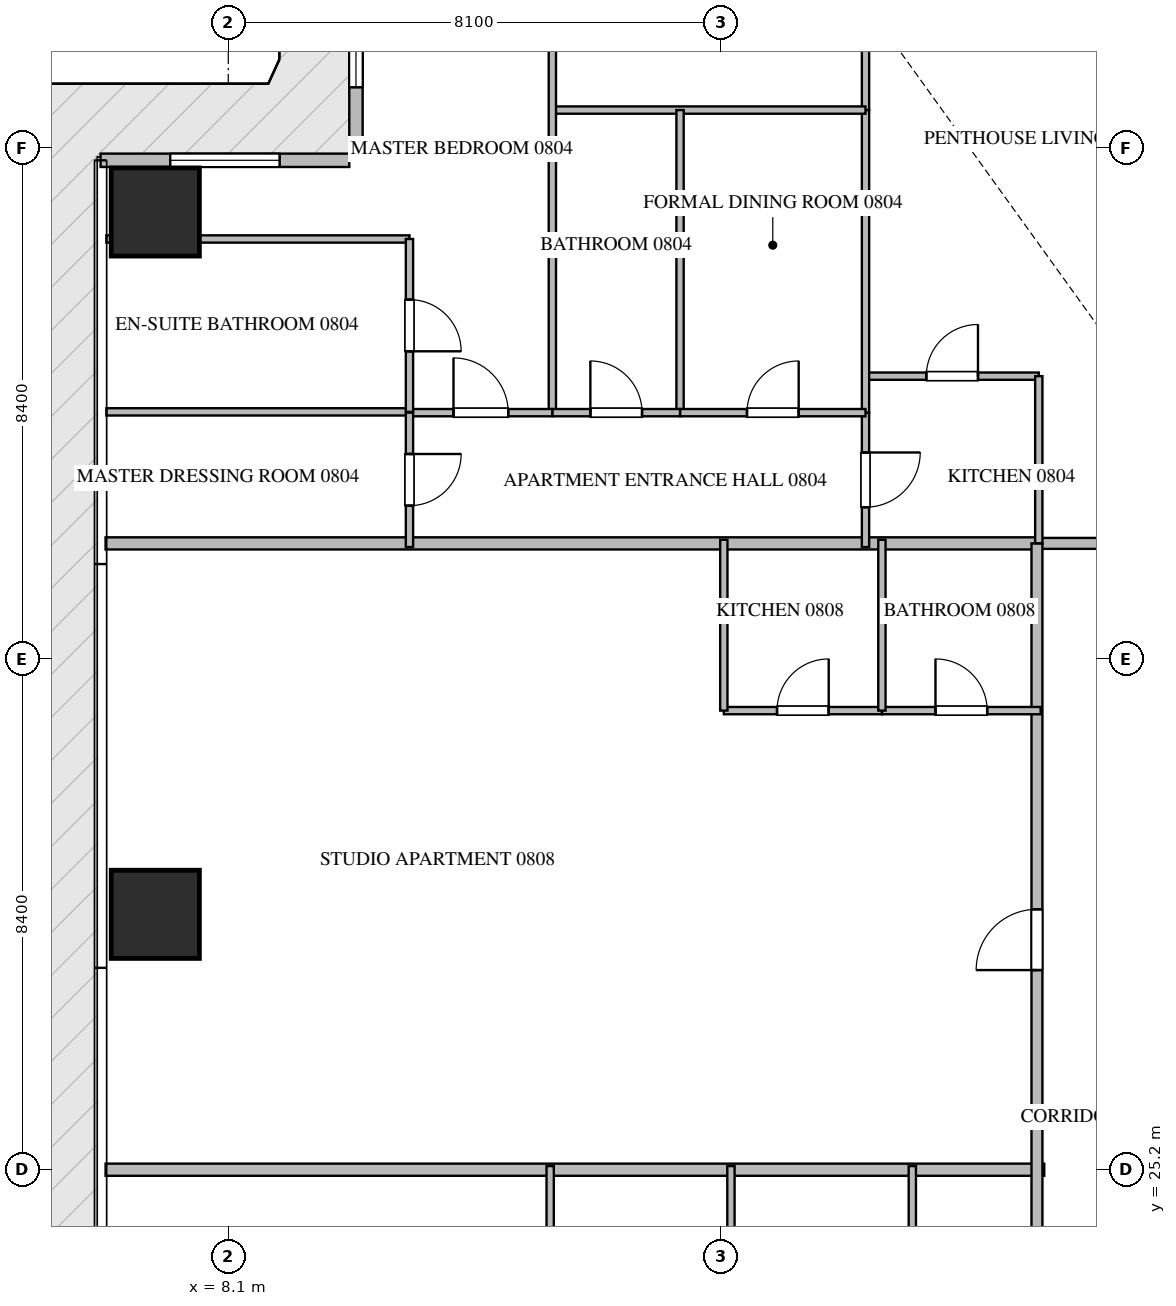
"""IFC4 building model, lengths in metres.
Left out: names, types, materials, properties, quantities, classifications, styles, units other than length and angle.
Written with IfcOpenShell. Run it as: python <this file> out.ifc"""

import sys

from ifc_helpers import new_model, si_unit, direction, frame, frame_2d, origin, origin_2d, place, context, subcontext, project, spatial, rectangle, extrude, source, transform, mapped, element, fill, save


model = new_model("IFC4")
c1 = context("Model", 3, precision=1e-05, world=origin(), true_north=direction((0.0, 1.0)))
c2 = subcontext(c1, "Body", "Model", "MODEL_VIEW")
j1 = project(units=[si_unit("LENGTHUNIT", "METRE"), si_unit("PLANEANGLEUNIT", "RADIAN")], contexts=[c1])
p1 = place(None, origin())
s1 = spatial("IfcSite", under=j1, at=p1, CompositionType="ELEMENT")
p2 = place(p1, origin())
s2 = spatial("IfcBuilding", under=s1, at=p2, CompositionType="ELEMENT")
p3 = place(p2, frame((0.0, 0.0, 37.95)))
s3 = spatial("IfcBuildingStorey", under=s2, at=p3, CompositionType="ELEMENT", Elevation=37.95)
m1 = source(origin(), c2, "Body", "SweptSolid", [
    extrude(rectangle(XDim=1.45, YDim=1.45, at=origin_2d()), origin(), (0.0, 0.0, 1.0), 3.75),
])
for number, where, z_axis, x_axis in (
    (1, (6.9, 29.4, -0.26), (0.0, 0.0, 1.0), (1.0, 0.0, 0.0)),
    (2, (6.9, 40.95, -0.26), (0.0, 0.0, 1.0), (1.0, 0.0, 0.0)),
):
    element("IfcColumn", number, at=place(p3, frame(where, z_axis=z_axis, x_axis=x_axis)), inside=s3, PredefinedType="COLUMN", context=c2, shape_type="MappedRepresentation", body=[
        mapped(m1, transform((0.0, 0.0, 0.0), scale=1.0)),
    ])
p4 = place(p3, frame((10.2, 45.89, 0.0), z_axis=(0.0, 0.0, 1.0), x_axis=(0.0, -1.0, 0.0)))
e3 = element("IfcWall", 3, at=p4, inside=s3, PredefinedType="ELEMENTEDWALL", context=c2, shape_type="SweptSolid", body=[
    extrude(rectangle(XDim=3.98, YDim=0.22, at=frame_2d((1.99, 0.0))), origin(), (0.0, 0.0, 1.0), 3.475),
])
p5 = place(p4, frame((1.09, 0.0, 0.65)))
e4 = element("IfcOpeningElement", 4, at=p5, cuts=e3, PredefinedType="OPENING", context=c2, shape_type="SweptSolid", body=[
    extrude(rectangle(XDim=1.8, YDim=2.1, at=frame_2d((0.9, 1.05))), frame((0.0, 0.12, 0.0), z_axis=(0.0, -1.0, 0.0), x_axis=(1.0, 0.0, 0.0)), (0.0, 0.0, 1.0), 0.24),
])
p6 = place(p3, frame((10.09, 41.8, 0.0), z_axis=(0.0, 0.0, 1.0), x_axis=(-1.0, 0.0, 0.0)))
e5 = element("IfcWall", 5, at=p6, inside=s3, PredefinedType="ELEMENTEDWALL", context=c2, shape_type="SweptSolid", body=[
    extrude(rectangle(XDim=4.09, YDim=0.22, at=frame_2d((2.045, 0.0))), origin(), (0.0, 0.0, 1.0), 3.475),
])
p7 = place(p6, frame((1.145, 0.0, 0.65)))
e6 = element("IfcOpeningElement", 6, at=p7, cuts=e5, PredefinedType="OPENING", context=c2, shape_type="SweptSolid", body=[
    extrude(rectangle(XDim=1.8, YDim=2.1, at=frame_2d((0.9, 1.05))), frame((0.0, 0.12, 0.0), z_axis=(0.0, -1.0, 0.0), x_axis=(1.0, 0.0, 0.0)), (0.0, 0.0, 1.0), 0.24),
])
p8 = place(p3, frame((6.082, 25.2, 0.0), z_axis=(0.0, 0.0, 1.0), x_axis=(1.0, 0.0, 0.0)))
e7 = element("IfcWall", 7, at=p8, inside=s3, PredefinedType="PARTITIONING", context=c2, shape_type="SweptSolid", body=[
    extrude(rectangle(XDim=15.438, YDim=0.2, at=frame_2d((7.719, 0.0))), origin(), (0.0, 0.0, 1.0), 3.49),
])
p9 = place(p3, frame((6.082, 35.5, 0.0), z_axis=(0.0, 0.0, 1.0), x_axis=(1.0, 0.0, 0.0)))
e8 = element("IfcWall", 8, at=p9, inside=s3, PredefinedType="PARTITIONING", context=c2, shape_type="SweptSolid", body=[
    extrude(rectangle(XDim=15.318, YDim=0.2, at=frame_2d((7.659, 0.0))), origin(), (0.0, 0.0, 1.0), 3.49),
])
p10 = place(p3, frame((21.402, 35.5, 0.0), z_axis=(0.0, 0.0, 1.0), x_axis=(1.0, 0.0, 0.0)))
e9 = element("IfcWall", 9, at=p10, inside=s3, PredefinedType="PARTITIONING", context=c2, shape_type="SweptSolid", body=[
    extrude(rectangle(XDim=21.996, YDim=0.18, at=frame_2d((10.998, 0.0))), origin(), (0.0, 0.0, 1.0), 3.49),
])
p11 = place(p10, frame((2.1, 0.0, 0.0)))
e10 = element("IfcOpeningElement", 10, at=p11, cuts=e9, PredefinedType="OPENING", context=c2, shape_type="SweptSolid", body=[
    extrude(rectangle(XDim=1.0, YDim=2.15, at=frame_2d((0.5, 1.075))), frame((0.0, 0.1, 0.0), z_axis=(0.0, -1.0, 0.0), x_axis=(1.0, 0.0, 0.0)), (0.0, 0.0, 1.0), 0.2),
])
p12 = place(p10, frame((10.498, 0.0, 0.0)))
e11 = element("IfcOpeningElement", 11, at=p12, cuts=e9, PredefinedType="OPENING", context=c2, shape_type="SweptSolid", body=[
    extrude(rectangle(XDim=1.0, YDim=2.15, at=frame_2d((0.5, 1.075))), frame((0.0, 0.1, 0.0), z_axis=(0.0, -1.0, 0.0), x_axis=(1.0, 0.0, 0.0)), (0.0, 0.0, 1.0), 0.2),
])
p13 = place(p10, frame((16.272, 0.0, 0.0)))
e12 = element("IfcOpeningElement", 12, at=p13, cuts=e9, PredefinedType="OPENING", context=c2, shape_type="SweptSolid", body=[
    extrude(rectangle(XDim=1.0, YDim=2.15, at=frame_2d((0.5, 1.075))), frame((0.0, 0.1, 0.0), z_axis=(0.0, -1.0, 0.0), x_axis=(1.0, 0.0, 0.0)), (0.0, 0.0, 1.0), 0.2),
])
p14 = place(p3, frame((21.4, 14.9, 0.0), z_axis=(0.0, 0.0, 1.0), x_axis=(0.0, 1.0, 0.0)))
e13 = element("IfcWall", 13, at=p14, inside=s3, PredefinedType="PARTITIONING", context=c2, shape_type="SweptSolid", body=[
    extrude(rectangle(XDim=20.6, YDim=0.18, at=frame_2d((10.3, 0.0))), origin(), (0.0, 0.0, 1.0), 3.49),
])
p15 = place(p14, frame((1.96, 0.0, 0.0)))
e14 = element("IfcOpeningElement", 14, at=p15, cuts=e13, PredefinedType="OPENING", context=c2, shape_type="SweptSolid", body=[
    extrude(rectangle(XDim=1.0, YDim=2.15, at=frame_2d((0.5, 1.075))), frame((0.0, 0.1, 0.0), z_axis=(0.0, -1.0, 0.0), x_axis=(1.0, 0.0, 0.0)), (0.0, 0.0, 1.0), 0.2),
])
p16 = place(p14, frame((13.583, 0.0, 0.0)))
e15 = element("IfcOpeningElement", 15, at=p16, cuts=e13, PredefinedType="OPENING", context=c2, shape_type="SweptSolid", body=[
    extrude(rectangle(XDim=1.0, YDim=2.15, at=frame_2d((0.5, 1.075))), frame((0.0, 0.1, 0.0), z_axis=(0.0, -1.0, 0.0), x_axis=(1.0, 0.0, 0.0)), (0.0, 0.0, 1.0), 0.2),
])
p17 = place(p3, frame((18.58, 38.25, 0.0), z_axis=(0.0, 0.0, 1.0), x_axis=(1.0, 0.0, 0.0)))
e16 = element("IfcWall", 16, at=p17, inside=s3, PredefinedType="PARTITIONING", context=c2, shape_type="SweptSolid", body=[
    extrude(rectangle(XDim=2.85, YDim=0.12, at=frame_2d((1.425, 0.0))), origin(), (0.0, 0.0, 1.0), 3.49),
])
p18 = place(p17, frame((1.0, 0.0, 0.0)))
e17 = element("IfcOpeningElement", 17, at=p18, cuts=e16, PredefinedType="OPENING", context=c2, shape_type="SweptSolid", body=[
    extrude(rectangle(XDim=0.85, YDim=2.1, at=frame_2d((0.425, 1.05))), frame((0.0, 0.07, 0.0), z_axis=(0.0, -1.0, 0.0), x_axis=(1.0, 0.0, 0.0)), (0.0, 0.0, 1.0), 0.14),
])
p19 = place(p3, frame((21.43, 38.25, 0.0), z_axis=(0.0, 0.0, 1.0), x_axis=(0.0, -1.0, 0.0)))
e18 = element("IfcWall", 18, at=p19, inside=s3, PredefinedType="PARTITIONING", context=c2, shape_type="SweptSolid", body=[
    extrude(rectangle(XDim=2.748, YDim=0.12, at=frame_2d((1.374, 0.0))), origin(), (0.0, 0.0, 1.0), 3.49),
])
p20 = place(p3, frame((18.58, 37.65, 0.0), z_axis=(0.0, 0.0, 1.0), x_axis=(0.0, -1.0, 0.0)))
e19 = element("IfcWall", 19, at=p20, inside=s3, PredefinedType="PARTITIONING", context=c2, shape_type="SweptSolid", body=[
    extrude(rectangle(XDim=2.21, YDim=0.12, at=frame_2d((1.105, 0.0))), origin(), (0.0, 0.0, 1.0), 3.49),
])
p21 = place(p20, frame((0.655, 0.0, 0.0)))
e20 = element("IfcOpeningElement", 20, at=p21, cuts=e19, PredefinedType="OPENING", context=c2, shape_type="SweptSolid", body=[
    extrude(rectangle(XDim=0.9, YDim=2.1, at=frame_2d((0.45, 1.05))), frame((0.0, 0.07, 0.0), z_axis=(0.0, -1.0, 0.0), x_axis=(1.0, 0.0, 0.0)), (0.0, 0.0, 1.0), 0.14),
])
p22 = place(p3, frame((18.58, 50.105, 0.0), z_axis=(0.0, 0.0, 1.0), x_axis=(0.0, -1.0, 0.0)))
e21 = element("IfcWall", 21, at=p22, inside=s3, PredefinedType="PARTITIONING", context=c2, shape_type="SweptSolid", body=[
    extrude(rectangle(XDim=7.479, YDim=0.12, at=frame_2d((3.74, 0.0))), origin(), (0.0, 0.0, 1.0), 3.49),
])
p23 = place(p22, frame((3.618, 0.0, 0.0)))
e22 = element("IfcOpeningElement", 22, at=p23, cuts=e21, PredefinedType="OPENING", context=c2, shape_type="SweptSolid", body=[
    extrude(rectangle(XDim=0.9, YDim=2.1, at=frame_2d((0.45, 1.05))), frame((0.0, 0.07, 0.0), z_axis=(0.0, -1.0, 0.0), x_axis=(1.0, 0.0, 0.0)), (0.0, 0.0, 1.0), 0.14),
])
p24 = place(p3, frame((18.58, 42.624, 0.0), z_axis=(0.0, 0.0, 1.0), x_axis=(0.0, -1.0, 0.0)))
e23 = element("IfcWall", 23, at=p24, inside=s3, PredefinedType="PARTITIONING", context=c2, shape_type="SweptSolid", body=[
    extrude(rectangle(XDim=4.972, YDim=0.12, at=frame_2d((2.486, 0.0))), origin(), (0.0, 0.0, 1.0), 3.49),
])
p25 = place(p3, frame((13.43, 42.626, 0.0), z_axis=(0.0, 0.0, 1.0), x_axis=(1.0, 0.0, 0.0)))
e24 = element("IfcWall", 24, at=p25, inside=s3, PredefinedType="PARTITIONING", context=c2, shape_type="SweptSolid", body=[
    extrude(rectangle(XDim=5.15, YDim=0.12, at=frame_2d((2.575, 0.0))), origin(), (0.0, 0.0, 1.0), 3.49),
])
p26 = place(p3, frame((13.43, 45.905, 0.0), z_axis=(0.0, 0.0, 1.0), x_axis=(0.0, -1.0, 0.0)))
e25 = element("IfcWall", 25, at=p26, inside=s3, PredefinedType="PARTITIONING", context=c2, shape_type="SweptSolid", body=[
    extrude(rectangle(XDim=8.255, YDim=0.12, at=frame_2d((4.127, 0.0))), origin(), (0.0, 0.0, 1.0), 3.49),
])
p27 = place(p3, frame((15.53, 42.626, 0.0), z_axis=(0.0, 0.0, 1.0), x_axis=(0.0, -1.0, 0.0)))
e26 = element("IfcWall", 26, at=p27, inside=s3, PredefinedType="PARTITIONING", context=c2, shape_type="SweptSolid", body=[
    extrude(rectangle(XDim=4.976, YDim=0.12, at=frame_2d((2.488, 0.0))), origin(), (0.0, 0.0, 1.0), 3.49),
])
p28 = place(p3, frame((13.43, 37.65, 0.0), z_axis=(0.0, 0.0, 1.0), x_axis=(1.0, 0.0, 0.0)))
e27 = element("IfcWall", 27, at=p28, inside=s3, PredefinedType="PARTITIONING", context=c2, shape_type="SweptSolid", body=[
    extrude(rectangle(XDim=2.1, YDim=0.12, at=frame_2d((1.05, 0.0))), origin(), (0.0, 0.0, 1.0), 3.49),
])
p29 = place(p28, frame((0.625, 0.0, 0.0)))
e28 = element("IfcOpeningElement", 28, at=p29, cuts=e27, PredefinedType="OPENING", context=c2, shape_type="SweptSolid", body=[
    extrude(rectangle(XDim=0.85, YDim=2.1, at=frame_2d((0.425, 1.05))), frame((0.0, 0.07, 0.0), z_axis=(0.0, -1.0, 0.0), x_axis=(1.0, 0.0, 0.0)), (0.0, 0.0, 1.0), 0.14),
])
p30 = place(p3, frame((15.532, 37.65, 0.0), z_axis=(0.0, 0.0, 1.0), x_axis=(1.0, 0.0, 0.0)))
e29 = element("IfcWall", 29, at=p30, inside=s3, PredefinedType="PARTITIONING", context=c2, shape_type="SweptSolid", body=[
    extrude(rectangle(XDim=3.048, YDim=0.12, at=frame_2d((1.524, 0.0))), origin(), (0.0, 0.0, 1.0), 3.49),
])
p31 = place(p30, frame((1.099, 0.0, 0.0)))
e30 = element("IfcOpeningElement", 30, at=p31, cuts=e29, PredefinedType="OPENING", context=c2, shape_type="SweptSolid", body=[
    extrude(rectangle(XDim=0.85, YDim=2.1, at=frame_2d((0.425, 1.05))), frame((0.0, 0.07, 0.0), z_axis=(0.0, -1.0, 0.0), x_axis=(1.0, 0.0, 0.0)), (0.0, 0.0, 1.0), 0.14),
])
p32 = place(p3, frame((11.08, 37.65, 0.0), z_axis=(0.0, 0.0, 1.0), x_axis=(1.0, 0.0, 0.0)))
e31 = element("IfcWall", 31, at=p32, inside=s3, PredefinedType="PARTITIONING", context=c2, shape_type="SweptSolid", body=[
    extrude(rectangle(XDim=2.348, YDim=0.12, at=frame_2d((1.174, 0.0))), origin(), (0.0, 0.0, 1.0), 3.49),
])
p33 = place(p32, frame((0.724, 0.0, 0.0)))
e32 = element("IfcOpeningElement", 32, at=p33, cuts=e31, PredefinedType="OPENING", context=c2, shape_type="SweptSolid", body=[
    extrude(rectangle(XDim=0.9, YDim=2.1, at=frame_2d((0.45, 1.05))), frame((0.0, 0.07, 0.0), z_axis=(0.0, -1.0, 0.0), x_axis=(1.0, 0.0, 0.0)), (0.0, 0.0, 1.0), 0.14),
])
p34 = place(p3, frame((6.095, 40.506, 0.0), z_axis=(0.0, 0.0, 1.0), x_axis=(1.0, 0.0, 0.0)))
e33 = element("IfcWall", 33, at=p34, inside=s3, PredefinedType="PARTITIONING", context=c2, shape_type="SweptSolid", body=[
    extrude(rectangle(XDim=4.985, YDim=0.12, at=frame_2d((2.493, 0.0))), origin(), (0.0, 0.0, 1.0), 3.49),
])
p35 = place(p3, frame((6.095, 37.663, 0.0), z_axis=(0.0, 0.0, 1.0), x_axis=(1.0, 0.0, 0.0)))
e34 = element("IfcWall", 34, at=p35, inside=s3, PredefinedType="PARTITIONING", context=c2, shape_type="SweptSolid", body=[
    extrude(rectangle(XDim=4.983, YDim=0.12, at=frame_2d((2.491, 0.0))), origin(), (0.0, 0.0, 1.0), 3.49),
])
p36 = place(p3, frame((11.08, 40.506, 0.0), z_axis=(0.0, 0.0, 1.0), x_axis=(0.0, -1.0, 0.0)))
e35 = element("IfcWall", 35, at=p36, inside=s3, PredefinedType="PARTITIONING", context=c2, shape_type="SweptSolid", body=[
    extrude(rectangle(XDim=2.843, YDim=0.12, at=frame_2d((1.421, 0.0))), origin(), (0.0, 0.0, 1.0), 3.49),
])
p37 = place(p36, frame((0.997, 0.0, 0.0)))
e36 = element("IfcOpeningElement", 36, at=p37, cuts=e35, PredefinedType="OPENING", context=c2, shape_type="SweptSolid", body=[
    extrude(rectangle(XDim=0.85, YDim=2.1, at=frame_2d((0.425, 1.05))), frame((0.0, 0.07, 0.0), z_axis=(0.0, -1.0, 0.0), x_axis=(1.0, 0.0, 0.0)), (0.0, 0.0, 1.0), 0.14),
])
p38 = place(p3, frame((11.08, 37.65, 0.0), z_axis=(0.0, 0.0, 1.0), x_axis=(0.0, -1.0, 0.0)))
e37 = element("IfcWall", 37, at=p38, inside=s3, PredefinedType="PARTITIONING", context=c2, shape_type="SweptSolid", body=[
    extrude(rectangle(XDim=2.21, YDim=0.12, at=frame_2d((1.105, 0.0))), origin(), (0.0, 0.0, 1.0), 3.49),
])
p39 = place(p38, frame((0.68, 0.0, 0.0)))
e38 = element("IfcOpeningElement", 38, at=p39, cuts=e37, PredefinedType="OPENING", context=c2, shape_type="SweptSolid", body=[
    extrude(rectangle(XDim=0.85, YDim=2.1, at=frame_2d((0.425, 1.05))), frame((0.0, 0.07, 0.0), z_axis=(0.0, -1.0, 0.0), x_axis=(1.0, 0.0, 0.0)), (0.0, 0.0, 1.0), 0.14),
])
for number, where, z_axis, x_axis in (
    (39, (13.394, 19.4, 0.0), (0.0, 0.0, 1.0), (0.0, 1.0, 0.0)),
    (40, (16.367, 19.4, 0.0), (0.0, 0.0, 1.0), (0.0, 1.0, 0.0)),
    (41, (19.35, 19.4, 0.0), (0.0, 0.0, 1.0), (0.0, 1.0, 0.0)),
):
    element("IfcWall", number, at=place(p3, frame(where, z_axis=z_axis, x_axis=x_axis)), inside=s3, PredefinedType="PARTITIONING", context=c2, shape_type="SweptSolid", body=[
        extrude(rectangle(XDim=5.86, YDim=0.12, at=frame_2d((2.93, 0.0))), origin(), (0.0, 0.0, 1.0), 3.49),
    ])
p40 = place(p3, frame((16.25, 32.75, 0.0), z_axis=(0.0, 0.0, 1.0), x_axis=(1.0, 0.0, 0.0)))
e42 = element("IfcWall", 42, at=p40, inside=s3, PredefinedType="PARTITIONING", context=c2, shape_type="SweptSolid", body=[
    extrude(rectangle(XDim=2.6, YDim=0.12, at=frame_2d((1.3, 0.0))), origin(), (0.0, 0.0, 1.0), 3.49),
])
p41 = place(p40, frame((0.875, 0.0, 0.0)))
e43 = element("IfcOpeningElement", 43, at=p41, cuts=e42, PredefinedType="OPENING", context=c2, shape_type="SweptSolid", body=[
    extrude(rectangle(XDim=0.85, YDim=2.1, at=frame_2d((0.425, 1.05))), frame((0.0, 0.07, 0.0), z_axis=(0.0, -1.0, 0.0), x_axis=(1.0, 0.0, 0.0)), (0.0, 0.0, 1.0), 0.14),
])
p42 = place(p3, frame((18.852, 32.75, 0.0), z_axis=(0.0, 0.0, 1.0), x_axis=(1.0, 0.0, 0.0)))
e44 = element("IfcWall", 44, at=p42, inside=s3, PredefinedType="PARTITIONING", context=c2, shape_type="SweptSolid", body=[
    extrude(rectangle(XDim=2.608, YDim=0.12, at=frame_2d((1.304, 0.0))), origin(), (0.0, 0.0, 1.0), 3.49),
])
p43 = place(p42, frame((0.879, 0.0, 0.0)))
e45 = element("IfcOpeningElement", 45, at=p43, cuts=e44, PredefinedType="OPENING", context=c2, shape_type="SweptSolid", body=[
    extrude(rectangle(XDim=0.85, YDim=2.1, at=frame_2d((0.425, 1.05))), frame((0.0, 0.07, 0.0), z_axis=(0.0, -1.0, 0.0), x_axis=(1.0, 0.0, 0.0)), (0.0, 0.0, 1.0), 0.14),
])
for number, where, z_axis, x_axis in (
    (46, (18.85, 32.75, 0.0), (0.0, 0.0, 1.0), (0.0, 1.0, 0.0)),
    (47, (16.25, 32.75, 0.0), (0.0, 0.0, 1.0), (0.0, 1.0, 0.0)),
):
    element("IfcWall", number, at=place(p3, frame(where, z_axis=z_axis, x_axis=x_axis)), inside=s3, PredefinedType="PARTITIONING", context=c2, shape_type="SweptSolid", body=[
        extrude(rectangle(XDim=2.81, YDim=0.12, at=frame_2d((1.405, 0.0))), origin(), (0.0, 0.0, 1.0), 3.49),
    ])
m2 = source(origin(), c2, "Body", "SweptSolid", [
    extrude(rectangle(XDim=1.8, YDim=2.1, at=frame_2d((0.9, 1.05))), frame((0.0, 0.03, 0.0), z_axis=(0.0, -1.0, 0.0), x_axis=(1.0, 0.0, 0.0)), (0.0, 0.0, 1.0), 0.06),
])
p44 = place(p5, origin())
e48 = element("IfcWindow", 48, at=p44, inside=s3, PartitioningType="SINGLE_PANEL", PredefinedType="WINDOW", context=c2, shape_type="MappedRepresentation", body=[
    mapped(m2, transform((0.0, 0.0, 0.0), scale=1.0)),
])
fill(e4, e48)
p45 = place(p7, origin())
e49 = element("IfcWindow", 49, at=p45, inside=s3, PartitioningType="SINGLE_PANEL", PredefinedType="WINDOW", context=c2, shape_type="MappedRepresentation", body=[
    mapped(m2, transform((0.0, 0.0, 0.0), scale=1.0)),
])
fill(e6, e49)
m3 = source(origin(), c2, "Body", "SweptSolid", [
    extrude(rectangle(XDim=1.0, YDim=2.15, at=frame_2d((0.5, 1.075))), frame((0.0, 0.025, 0.0), z_axis=(0.0, -1.0, 0.0), x_axis=(1.0, 0.0, 0.0)), (0.0, 0.0, 1.0), 0.05),
])
p46 = place(p16, origin())
e50 = element("IfcDoor", 50, at=p46, inside=s3, OperationType="SINGLE_SWING_LEFT", PredefinedType="DOOR", context=c2, shape_type="MappedRepresentation", body=[
    mapped(m3, transform((0.0, 0.0, 0.0), scale=1.0)),
])
fill(e15, e50)
m4 = source(origin(), c2, "Body", "SweptSolid", [
    extrude(rectangle(XDim=0.85, YDim=2.1, at=frame_2d((0.425, 1.05))), frame((0.0, 0.025, 0.0), z_axis=(0.0, -1.0, 0.0), x_axis=(1.0, 0.0, 0.0)), (0.0, 0.0, 1.0), 0.05),
])
p47 = place(p18, origin())
e51 = element("IfcDoor", 51, at=p47, inside=s3, OperationType="SINGLE_SWING_RIGHT", PredefinedType="DOOR", context=c2, shape_type="MappedRepresentation", body=[
    mapped(m4, transform((0.0, 0.0, 0.0), scale=1.0)),
])
fill(e17, e51)
m5 = source(origin(), c2, "Body", "SweptSolid", [
    extrude(rectangle(XDim=0.9, YDim=2.1, at=frame_2d((0.45, 1.05))), frame((0.0, 0.025, 0.0), z_axis=(0.0, -1.0, 0.0), x_axis=(1.0, 0.0, 0.0)), (0.0, 0.0, 1.0), 0.05),
])
p48 = place(p21, origin())
e52 = element("IfcDoor", 52, at=p48, inside=s3, OperationType="SINGLE_SWING_LEFT", PredefinedType="DOOR", context=c2, shape_type="MappedRepresentation", body=[
    mapped(m5, transform((0.0, 0.0, 0.0), scale=1.0)),
])
fill(e20, e52)
p49 = place(p29, origin())
e53 = element("IfcDoor", 53, at=p49, inside=s3, OperationType="SINGLE_SWING_LEFT", PredefinedType="DOOR", context=c2, shape_type="MappedRepresentation", body=[
    mapped(m4, transform((0.0, 0.0, 0.0), scale=1.0)),
])
fill(e28, e53)
p50 = place(p31, origin())
e54 = element("IfcDoor", 54, at=p50, inside=s3, OperationType="SINGLE_SWING_RIGHT", PredefinedType="DOOR", context=c2, shape_type="MappedRepresentation", body=[
    mapped(m4, transform((0.0, 0.0, 0.0), scale=1.0)),
])
fill(e30, e54)
p51 = place(p33, origin())
e55 = element("IfcDoor", 55, at=p51, inside=s3, OperationType="SINGLE_SWING_LEFT", PredefinedType="DOOR", context=c2, shape_type="MappedRepresentation", body=[
    mapped(m5, transform((0.0, 0.0, 0.0), scale=1.0)),
])
fill(e32, e55)
p52 = place(p37, origin())
e56 = element("IfcDoor", 56, at=p52, inside=s3, OperationType="SINGLE_SWING_RIGHT", PredefinedType="DOOR", context=c2, shape_type="MappedRepresentation", body=[
    mapped(m4, transform((0.0, 0.0, 0.0), scale=1.0)),
])
fill(e36, e56)
p53 = place(p39, origin())
e57 = element("IfcDoor", 57, at=p53, inside=s3, OperationType="SINGLE_SWING_LEFT", PredefinedType="DOOR", context=c2, shape_type="MappedRepresentation", body=[
    mapped(m4, transform((0.0, 0.0, 0.0), scale=1.0)),
])
fill(e38, e57)
p54 = place(p41, origin())
e58 = element("IfcDoor", 58, at=p54, inside=s3, OperationType="SINGLE_SWING_RIGHT", PredefinedType="DOOR", context=c2, shape_type="MappedRepresentation", body=[
    mapped(m4, transform((0.0, 0.0, 0.0), scale=1.0)),
])
fill(e43, e58)
p55 = place(p43, origin())
e59 = element("IfcDoor", 59, at=p55, inside=s3, OperationType="SINGLE_SWING_LEFT", PredefinedType="DOOR", context=c2, shape_type="MappedRepresentation", body=[
    mapped(m4, transform((0.0, 0.0, 0.0), scale=1.0)),
])
fill(e45, e59)
save(model, sys.argv[1])
